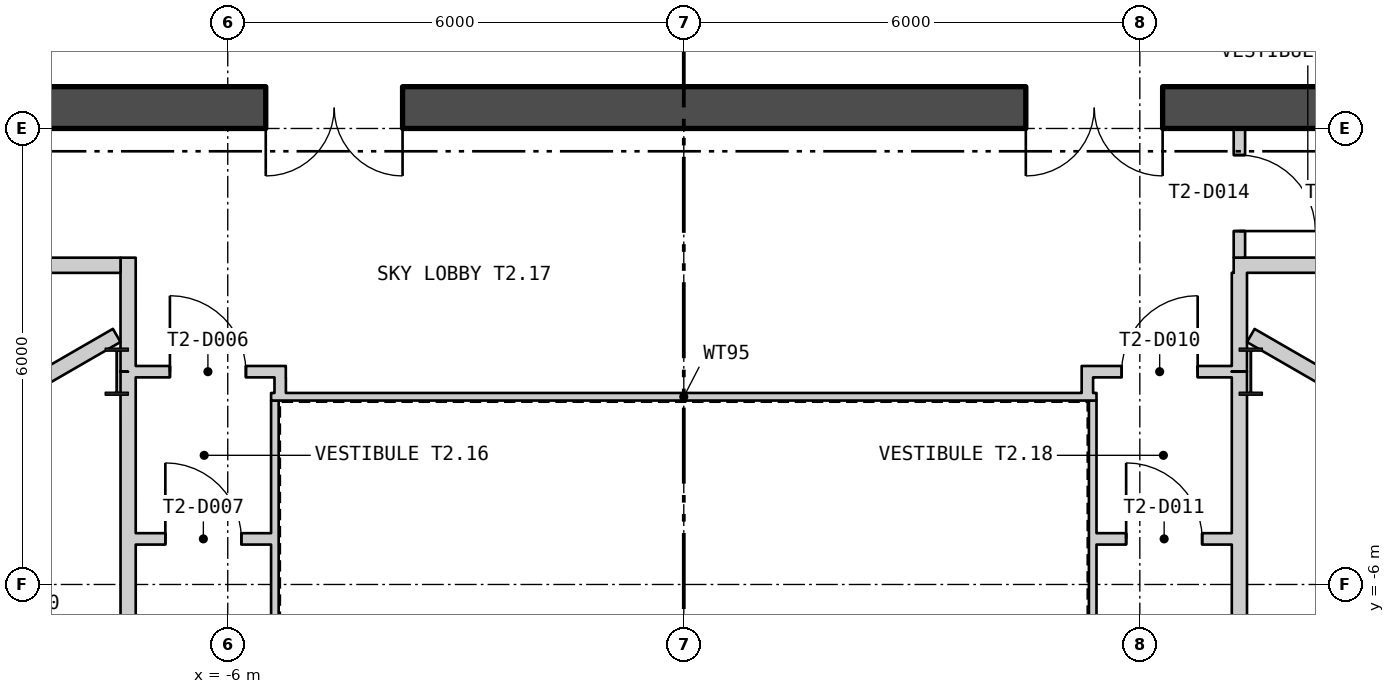
"""IFC4 building model, lengths in metres.
Left out: names, types, materials, properties, quantities, classifications, styles, units other than length and angle.
Written with IfcOpenShell. Run it as: python <this file> out.ifc"""

import sys

from ifc_helpers import new_model, si_unit, direction, frame, frame_2d, origin, origin_2d, place, context, subcontext, project, spatial, polyline, rectangle, i_section, outline, extrude, element, fill, save


model = new_model("IFC4")
c1 = context("Model", 3, precision=1e-05, world=origin(), true_north=direction((0.0, 1.0)))
c2 = subcontext(c1, "Body", "Model", "MODEL_VIEW")
j1 = project(units=[si_unit("LENGTHUNIT", "METRE"), si_unit("PLANEANGLEUNIT", "RADIAN")], contexts=[c1])
p1 = place(None, origin())
s1 = spatial("IfcSite", under=j1, at=p1, CompositionType="ELEMENT")
p2 = place(p1, origin())
s2 = spatial("IfcBuilding", under=s1, at=p2, CompositionType="ELEMENT")
p3 = place(p2, frame((0.0, 0.0, 133.8)))
s3 = spatial("IfcBuildingStorey", under=s2, at=p3, CompositionType="ELEMENT", Elevation=133.8)
for number, where, z_axis, x_axis in (
    (1, (7.46, -3.2, 0.0), (0.0, 0.0, 1.0), (1.0, 0.0, 0.0)),
    (2, (-7.46, -3.2, 0.0), (0.0, 0.0, 1.0), (1.0, 0.0, 0.0)),
):
    element("IfcColumn", number, at=place(p3, frame(where, z_axis=z_axis, x_axis=x_axis)), inside=s3, PredefinedType="COLUMN", context=c2, shape_type="SweptSolid", body=[
        extrude(i_section(OverallWidth=0.305, OverallDepth=0.62, WebThickness=0.021, FlangeThickness=0.04, at=origin_2d()), origin(), (0.0, 0.0, 1.0), 6.0),
    ])
p4 = place(p3, frame((-27.365, 12.198, -0.18), z_axis=(0.0, 0.0, 1.0), x_axis=(0.500000335318, -0.866025210188, 0.0)))
e3 = element("IfcWall", 3, at=p4, inside=s3, PredefinedType="SOLIDWALL", context=c2, shape_type="SweptSolid", body=[
    extrude(outline(polyline([(-0.13, -0.225), (45.88, -0.225), (45.62, 0.225), (0.13, 0.225), (-0.13, -0.225)])), origin(), (0.0, 0.0, 1.0), 6.0),
])
p5 = place(p4, frame((1.425, 0.0, 1.38)))
e4 = element("IfcOpeningElement", 4, at=p5, cuts=e3, PredefinedType="OPENING", context=c2, shape_type="SweptSolid", body=[
    extrude(rectangle(XDim=2.4, YDim=3.6, at=frame_2d((1.2, 1.8))), frame((0.0, 0.235, 0.0), z_axis=(0.0, -1.0, 0.0), x_axis=(1.0, 0.0, 0.0)), (0.0, 0.0, 1.0), 0.47),
])
p6 = place(p4, frame((5.895, 0.0, 1.38)))
e5 = element("IfcOpeningElement", 5, at=p6, cuts=e3, PredefinedType="OPENING", context=c2, shape_type="SweptSolid", body=[
    extrude(rectangle(XDim=2.4, YDim=3.6, at=frame_2d((1.2, 1.8))), frame((0.0, 0.235, 0.0), z_axis=(0.0, -1.0, 0.0), x_axis=(1.0, 0.0, 0.0)), (0.0, 0.0, 1.0), 0.47),
])
p7 = place(p4, frame((10.403, 0.0, 1.38)))
e6 = element("IfcOpeningElement", 6, at=p7, cuts=e3, PredefinedType="OPENING", context=c2, shape_type="SweptSolid", body=[
    extrude(rectangle(XDim=2.4, YDim=3.6, at=frame_2d((1.2, 1.8))), frame((0.0, 0.235, 0.0), z_axis=(0.0, -1.0, 0.0), x_axis=(1.0, 0.0, 0.0)), (0.0, 0.0, 1.0), 0.47),
])
p8 = place(p4, frame((14.912, 0.0, 1.38)))
e7 = element("IfcOpeningElement", 7, at=p8, cuts=e3, PredefinedType="OPENING", context=c2, shape_type="SweptSolid", body=[
    extrude(rectangle(XDim=2.4, YDim=3.6, at=frame_2d((1.2, 1.8))), frame((0.0, 0.235, 0.0), z_axis=(0.0, -1.0, 0.0), x_axis=(1.0, 0.0, 0.0)), (0.0, 0.0, 1.0), 0.47),
])
p9 = place(p4, frame((19.421, 0.0, 1.38)))
e8 = element("IfcOpeningElement", 8, at=p9, cuts=e3, PredefinedType="OPENING", context=c2, shape_type="SweptSolid", body=[
    extrude(rectangle(XDim=2.4, YDim=3.6, at=frame_2d((1.2, 1.8))), frame((0.0, 0.235, 0.0), z_axis=(0.0, -1.0, 0.0), x_axis=(1.0, 0.0, 0.0)), (0.0, 0.0, 1.0), 0.47),
])
p10 = place(p4, frame((23.929, 0.0, 1.38)))
e9 = element("IfcOpeningElement", 9, at=p10, cuts=e3, PredefinedType="OPENING", context=c2, shape_type="SweptSolid", body=[
    extrude(rectangle(XDim=2.4, YDim=3.6, at=frame_2d((1.2, 1.8))), frame((0.0, 0.235, 0.0), z_axis=(0.0, -1.0, 0.0), x_axis=(1.0, 0.0, 0.0)), (0.0, 0.0, 1.0), 0.47),
])
p11 = place(p4, frame((28.438, 0.0, 1.38)))
e10 = element("IfcOpeningElement", 10, at=p11, cuts=e3, PredefinedType="OPENING", context=c2, shape_type="SweptSolid", body=[
    extrude(rectangle(XDim=2.4, YDim=3.6, at=frame_2d((1.2, 1.8))), frame((0.0, 0.235, 0.0), z_axis=(0.0, -1.0, 0.0), x_axis=(1.0, 0.0, 0.0)), (0.0, 0.0, 1.0), 0.47),
])
p12 = place(p4, frame((32.947, 0.0, 1.38)))
e11 = element("IfcOpeningElement", 11, at=p12, cuts=e3, PredefinedType="OPENING", context=c2, shape_type="SweptSolid", body=[
    extrude(rectangle(XDim=2.4, YDim=3.6, at=frame_2d((1.2, 1.8))), frame((0.0, 0.235, 0.0), z_axis=(0.0, -1.0, 0.0), x_axis=(1.0, 0.0, 0.0)), (0.0, 0.0, 1.0), 0.47),
])
p13 = place(p4, frame((37.455, 0.0, 1.38)))
e12 = element("IfcOpeningElement", 12, at=p13, cuts=e3, PredefinedType="OPENING", context=c2, shape_type="SweptSolid", body=[
    extrude(rectangle(XDim=2.4, YDim=3.6, at=frame_2d((1.2, 1.8))), frame((0.0, 0.235, 0.0), z_axis=(0.0, -1.0, 0.0), x_axis=(1.0, 0.0, 0.0)), (0.0, 0.0, 1.0), 0.47),
])
p14 = place(p4, frame((41.925, 0.0, 1.38)))
e13 = element("IfcOpeningElement", 13, at=p14, cuts=e3, PredefinedType="OPENING", context=c2, shape_type="SweptSolid", body=[
    extrude(rectangle(XDim=2.4, YDim=3.6, at=frame_2d((1.2, 1.8))), frame((0.0, 0.235, 0.0), z_axis=(0.0, -1.0, 0.0), x_axis=(1.0, 0.0, 0.0)), (0.0, 0.0, 1.0), 0.47),
])
p15 = place(p3, frame((4.49, -27.423, -0.18), z_axis=(0.0, 0.0, 1.0), x_axis=(0.500000335318, 0.866025210188, 0.0)))
e14 = element("IfcWall", 14, at=p15, inside=s3, PredefinedType="SOLIDWALL", context=c2, shape_type="SweptSolid", body=[
    extrude(outline(polyline([(-0.13, -0.225), (45.88, -0.225), (45.62, 0.225), (0.13, 0.225), (-0.13, -0.225)])), origin(), (0.0, 0.0, 1.0), 6.0),
])
p16 = place(p15, frame((1.425, 0.0, 1.38)))
e15 = element("IfcOpeningElement", 15, at=p16, cuts=e14, PredefinedType="OPENING", context=c2, shape_type="SweptSolid", body=[
    extrude(rectangle(XDim=2.4, YDim=3.6, at=frame_2d((1.2, 1.8))), frame((0.0, 0.235, 0.0), z_axis=(0.0, -1.0, 0.0), x_axis=(1.0, 0.0, 0.0)), (0.0, 0.0, 1.0), 0.47),
])
p17 = place(p15, frame((5.895, 0.0, 1.38)))
e16 = element("IfcOpeningElement", 16, at=p17, cuts=e14, PredefinedType="OPENING", context=c2, shape_type="SweptSolid", body=[
    extrude(rectangle(XDim=2.4, YDim=3.6, at=frame_2d((1.2, 1.8))), frame((0.0, 0.235, 0.0), z_axis=(0.0, -1.0, 0.0), x_axis=(1.0, 0.0, 0.0)), (0.0, 0.0, 1.0), 0.47),
])
p18 = place(p15, frame((10.403, 0.0, 1.38)))
e17 = element("IfcOpeningElement", 17, at=p18, cuts=e14, PredefinedType="OPENING", context=c2, shape_type="SweptSolid", body=[
    extrude(rectangle(XDim=2.4, YDim=3.6, at=frame_2d((1.2, 1.8))), frame((0.0, 0.235, 0.0), z_axis=(0.0, -1.0, 0.0), x_axis=(1.0, 0.0, 0.0)), (0.0, 0.0, 1.0), 0.47),
])
p19 = place(p15, frame((14.912, 0.0, 1.38)))
e18 = element("IfcOpeningElement", 18, at=p19, cuts=e14, PredefinedType="OPENING", context=c2, shape_type="SweptSolid", body=[
    extrude(rectangle(XDim=2.4, YDim=3.6, at=frame_2d((1.2, 1.8))), frame((0.0, 0.235, 0.0), z_axis=(0.0, -1.0, 0.0), x_axis=(1.0, 0.0, 0.0)), (0.0, 0.0, 1.0), 0.47),
])
p20 = place(p15, frame((19.421, 0.0, 1.38)))
e19 = element("IfcOpeningElement", 19, at=p20, cuts=e14, PredefinedType="OPENING", context=c2, shape_type="SweptSolid", body=[
    extrude(rectangle(XDim=2.4, YDim=3.6, at=frame_2d((1.2, 1.8))), frame((0.0, 0.235, 0.0), z_axis=(0.0, -1.0, 0.0), x_axis=(1.0, 0.0, 0.0)), (0.0, 0.0, 1.0), 0.47),
])
p21 = place(p15, frame((23.929, 0.0, 1.38)))
e20 = element("IfcOpeningElement", 20, at=p21, cuts=e14, PredefinedType="OPENING", context=c2, shape_type="SweptSolid", body=[
    extrude(rectangle(XDim=2.4, YDim=3.6, at=frame_2d((1.2, 1.8))), frame((0.0, 0.235, 0.0), z_axis=(0.0, -1.0, 0.0), x_axis=(1.0, 0.0, 0.0)), (0.0, 0.0, 1.0), 0.47),
])
p22 = place(p15, frame((28.438, 0.0, 1.38)))
e21 = element("IfcOpeningElement", 21, at=p22, cuts=e14, PredefinedType="OPENING", context=c2, shape_type="SweptSolid", body=[
    extrude(rectangle(XDim=2.4, YDim=3.6, at=frame_2d((1.2, 1.8))), frame((0.0, 0.235, 0.0), z_axis=(0.0, -1.0, 0.0), x_axis=(1.0, 0.0, 0.0)), (0.0, 0.0, 1.0), 0.47),
])
p23 = place(p15, frame((32.947, 0.0, 1.38)))
e22 = element("IfcOpeningElement", 22, at=p23, cuts=e14, PredefinedType="OPENING", context=c2, shape_type="SweptSolid", body=[
    extrude(rectangle(XDim=2.4, YDim=3.6, at=frame_2d((1.2, 1.8))), frame((0.0, 0.235, 0.0), z_axis=(0.0, -1.0, 0.0), x_axis=(1.0, 0.0, 0.0)), (0.0, 0.0, 1.0), 0.47),
])
p24 = place(p15, frame((37.455, 0.0, 1.38)))
e23 = element("IfcOpeningElement", 23, at=p24, cuts=e14, PredefinedType="OPENING", context=c2, shape_type="SweptSolid", body=[
    extrude(rectangle(XDim=2.4, YDim=3.6, at=frame_2d((1.2, 1.8))), frame((0.0, 0.235, 0.0), z_axis=(0.0, -1.0, 0.0), x_axis=(1.0, 0.0, 0.0)), (0.0, 0.0, 1.0), 0.47),
])
p25 = place(p15, frame((41.925, 0.0, 1.38)))
e24 = element("IfcOpeningElement", 24, at=p25, cuts=e14, PredefinedType="OPENING", context=c2, shape_type="SweptSolid", body=[
    extrude(rectangle(XDim=2.4, YDim=3.6, at=frame_2d((1.2, 1.8))), frame((0.0, 0.235, 0.0), z_axis=(0.0, -1.0, 0.0), x_axis=(1.0, 0.0, 0.0)), (0.0, 0.0, 1.0), 0.47),
])
p26 = place(p3, frame((5.38, -11.62, 0.0), z_axis=(0.0, 0.0, 1.0), x_axis=(0.0, 1.0, 0.0)))
e25 = element("IfcWall", 25, at=p26, inside=s3, PredefinedType="PARTITIONING", context=c2, shape_type="SweptSolid", body=[
    extrude(rectangle(XDim=8.04, YDim=0.1, at=frame_2d((4.02, 0.0))), origin(), (0.0, 0.0, 1.0), 5.8),
])
p27 = place(p3, frame((5.43, -3.53, 0.0), z_axis=(0.0, 0.0, 1.0), x_axis=(-1.0, 0.0, 0.0)))
e26 = element("IfcWall", 26, at=p27, inside=s3, PredefinedType="PARTITIONING", context=c2, shape_type="SweptSolid", body=[
    extrude(rectangle(XDim=10.86, YDim=0.1, at=frame_2d((5.43, 0.0))), origin(), (0.0, 0.0, 1.0), 5.8),
])
p28 = place(p3, frame((-5.38, -3.58, 0.0), z_axis=(0.0, 0.0, 1.0), x_axis=(0.0, -1.0, 0.0)))
e27 = element("IfcWall", 27, at=p28, inside=s3, PredefinedType="PARTITIONING", context=c2, shape_type="SweptSolid", body=[
    extrude(rectangle(XDim=8.04, YDim=0.1, at=frame_2d((4.02, 0.0))), origin(), (0.0, 0.0, 1.0), 5.8),
])
p29 = place(p3, frame((-17.5, 0.275, 0.0), z_axis=(0.0, 0.0, 1.0), x_axis=(1.0, 0.0, 0.0)))
e28 = element("IfcWall", 28, at=p29, inside=s3, PredefinedType="SHEAR", context=c2, shape_type="SweptSolid", body=[
    extrude(rectangle(XDim=35.0, YDim=0.55, at=frame_2d((17.5, 0.0))), origin(), (0.0, 0.0, 1.0), 5.8),
])
p30 = place(p29, frame((12.0, 0.0, 0.0)))
e29 = element("IfcOpeningElement", 29, at=p30, cuts=e28, PredefinedType="OPENING", context=c2, shape_type="SweptSolid", body=[
    extrude(rectangle(XDim=1.8, YDim=2.4, at=frame_2d((0.9, 1.2))), frame((0.0, 0.285, 0.0), z_axis=(0.0, -1.0, 0.0), x_axis=(1.0, 0.0, 0.0)), (0.0, 0.0, 1.0), 0.57),
])
p31 = place(p29, frame((22.0, 0.0, 0.0)))
e30 = element("IfcOpeningElement", 30, at=p31, cuts=e28, PredefinedType="OPENING", context=c2, shape_type="SweptSolid", body=[
    extrude(rectangle(XDim=1.8, YDim=2.4, at=frame_2d((0.9, 1.2))), frame((0.0, 0.285, 0.0), z_axis=(0.0, -1.0, 0.0), x_axis=(1.0, 0.0, 0.0)), (0.0, 0.0, 1.0), 0.57),
])
p32 = place(p3, frame((-19.023, -1.8, 0.0), z_axis=(0.0, 0.0, 1.0), x_axis=(1.0, 0.0, 0.0)))
e31 = element("IfcWall", 31, at=p32, inside=s3, PredefinedType="PARTITIONING", context=c2, shape_type="SweptSolid", body=[
    extrude(rectangle(XDim=11.612, YDim=0.2, at=frame_2d((5.806, 0.0))), origin(), (0.0, 0.0, 1.0), 5.8),
])
p33 = place(p32, frame((7.262, 0.0, 0.0)))
e32 = element("IfcOpeningElement", 32, at=p33, cuts=e31, PredefinedType="OPENING", context=c2, shape_type="SweptSolid", body=[
    extrude(rectangle(XDim=1.1, YDim=2.1, at=frame_2d((0.55, 1.05))), frame((0.0, 0.11, 0.0), z_axis=(0.0, -1.0, 0.0), x_axis=(1.0, 0.0, 0.0)), (0.0, 0.0, 1.0), 0.22),
])
p34 = place(p3, frame((-15.344, -7.274, 0.0), z_axis=(0.0, 0.0, 1.0), x_axis=(0.866037399706, 0.499979221878, 0.0)))
e33 = element("IfcWall", 33, at=p34, inside=s3, PredefinedType="PARTITIONING", context=c2, shape_type="SweptSolid", body=[
    extrude(rectangle(XDim=9.102, YDim=0.2, at=frame_2d((4.551, 0.0))), origin(), (0.0, 0.0, 1.0), 5.8),
])
p35 = place(p3, frame((-7.31, -13.699, 0.0), z_axis=(0.0, 0.0, 1.0), x_axis=(-8.5722449e-05, 0.999999996326, 0.0)))
e34 = element("IfcWall", 34, at=p35, inside=s3, PredefinedType="PARTITIONING", context=c2, shape_type="SweptSolid", body=[
    extrude(rectangle(XDim=10.499, YDim=0.2, at=frame_2d((5.25, 0.0))), origin(), (0.0, 0.0, 1.0), 5.21),
])
p36 = place(p35, frame((2.653, 0.0, 0.0)))
e35 = element("IfcOpeningElement", 35, at=p36, cuts=e34, PredefinedType="OPENING", context=c2, shape_type="SweptSolid", body=[
    extrude(rectangle(XDim=1.1, YDim=2.1, at=frame_2d((0.55, 1.05))), frame((0.0, 0.11, 0.0), z_axis=(0.0, -1.0, 0.0), x_axis=(1.0, 0.0, 0.0)), (0.0, 0.0, 1.0), 0.22),
])
p37 = place(p35, frame((6.056, 0.0, 0.0)))
e36 = element("IfcOpeningElement", 36, at=p37, cuts=e34, PredefinedType="OPENING", context=c2, shape_type="SweptSolid", body=[
    extrude(rectangle(XDim=1.1, YDim=2.1, at=frame_2d((0.55, 1.05))), frame((0.0, 0.11, 0.0), z_axis=(0.0, -1.0, 0.0), x_axis=(1.0, 0.0, 0.0)), (0.0, 0.0, 1.0), 0.22),
])
p38 = place(p3, frame((-7.311, -3.2, 0.0), z_axis=(0.0, 0.0, 1.0), x_axis=(-6.6666667e-05, 0.999999997778, 0.0)))
e37 = element("IfcWall", 37, at=p38, inside=s3, PredefinedType="PARTITIONING", context=c2, shape_type="SweptSolid", body=[
    extrude(rectangle(XDim=1.5, YDim=0.2, at=frame_2d((0.75, 0.0))), origin(), (0.0, 0.0, 1.0), 5.8),
])
p39 = place(p3, frame((-7.211, -3.2, 0.0), z_axis=(0.0, 0.0, 1.0), x_axis=(1.0, 0.0, 0.0)))
e38 = element("IfcWall", 38, at=p39, inside=s3, PredefinedType="PARTITIONING", context=c2, shape_type="SweptSolid", body=[
    extrude(rectangle(XDim=1.975, YDim=0.15, at=frame_2d((0.988, 0.0))), origin(), (0.0, 0.0, 1.0), 4.89),
])
p40 = place(p39, frame((0.45, 0.0, 0.0)))
e39 = element("IfcOpeningElement", 39, at=p40, cuts=e38, PredefinedType="OPENING", context=c2, shape_type="SweptSolid", body=[
    extrude(rectangle(XDim=1.0, YDim=2.1, at=frame_2d((0.5, 1.05))), frame((0.0, 0.085, 0.0), z_axis=(0.0, -1.0, 0.0), x_axis=(1.0, 0.0, 0.0)), (0.0, 0.0, 1.0), 0.17),
])
p41 = place(p3, frame((-7.211, -5.4, 0.0), z_axis=(0.0, 0.0, 1.0), x_axis=(1.0, 0.0, 0.0)))
e40 = element("IfcWall", 40, at=p41, inside=s3, PredefinedType="PARTITIONING", context=c2, shape_type="SweptSolid", body=[
    extrude(rectangle(XDim=1.781, YDim=0.15, at=frame_2d((0.89, 0.0))), origin(), (0.0, 0.0, 1.0), 5.8),
])
p42 = place(p41, frame((0.39, 0.0, 0.0)))
e41 = element("IfcOpeningElement", 41, at=p42, cuts=e40, PredefinedType="OPENING", context=c2, shape_type="SweptSolid", body=[
    extrude(rectangle(XDim=1.0, YDim=2.1, at=frame_2d((0.5, 1.05))), frame((0.0, 0.085, 0.0), z_axis=(0.0, -1.0, 0.0), x_axis=(1.0, 0.0, 0.0)), (0.0, 0.0, 1.0), 0.17),
])
p43 = place(p3, frame((-5.31, -3.48, 0.0), z_axis=(0.0, 0.0, 1.0), x_axis=(0.0, 1.0, 0.0)))
e42 = element("IfcWall", 42, at=p43, inside=s3, PredefinedType="PARTITIONING", context=c2, shape_type="SweptSolid", body=[
    extrude(rectangle(XDim=0.205, YDim=0.15, at=frame_2d((0.102, 0.0))), origin(), (0.0, 0.0, 1.0), 5.8),
])
p44 = place(p3, frame((5.235, -3.2, 0.0), z_axis=(0.0, 0.0, 1.0), x_axis=(1.0, 0.0, 0.0)))
e43 = element("IfcWall", 43, at=p44, inside=s3, PredefinedType="PARTITIONING", context=c2, shape_type="SweptSolid", body=[
    extrude(rectangle(XDim=1.975, YDim=0.15, at=frame_2d((0.988, 0.0))), origin(), (0.0, 0.0, 1.0), 4.89),
])
p45 = place(p44, frame((0.526, 0.0, 0.0)))
e44 = element("IfcOpeningElement", 44, at=p45, cuts=e43, PredefinedType="OPENING", context=c2, shape_type="SweptSolid", body=[
    extrude(rectangle(XDim=1.0, YDim=2.1, at=frame_2d((0.5, 1.05))), frame((0.0, 0.085, 0.0), z_axis=(0.0, -1.0, 0.0), x_axis=(1.0, 0.0, 0.0)), (0.0, 0.0, 1.0), 0.17),
])
p46 = place(p3, frame((5.31, -3.48, 0.0), z_axis=(0.0, 0.0, 1.0), x_axis=(0.0, 1.0, 0.0)))
e45 = element("IfcWall", 45, at=p46, inside=s3, PredefinedType="PARTITIONING", context=c2, shape_type="SweptSolid", body=[
    extrude(rectangle(XDim=0.205, YDim=0.15, at=frame_2d((0.102, 0.0))), origin(), (0.0, 0.0, 1.0), 5.8),
])
p47 = place(p3, frame((5.43, -5.4, 0.0), z_axis=(0.0, 0.0, 1.0), x_axis=(1.0, 0.0, 0.0)))
e46 = element("IfcWall", 46, at=p47, inside=s3, PredefinedType="PARTITIONING", context=c2, shape_type="SweptSolid", body=[
    extrude(rectangle(XDim=1.78, YDim=0.15, at=frame_2d((0.89, 0.0))), origin(), (0.0, 0.0, 1.0), 5.8),
])
p48 = place(p47, frame((0.39, 0.0, 0.0)))
e47 = element("IfcOpeningElement", 47, at=p48, cuts=e46, PredefinedType="OPENING", context=c2, shape_type="SweptSolid", body=[
    extrude(rectangle(XDim=1.0, YDim=2.1, at=frame_2d((0.5, 1.05))), frame((0.0, 0.085, 0.0), z_axis=(0.0, -1.0, 0.0), x_axis=(1.0, 0.0, 0.0)), (0.0, 0.0, 1.0), 0.17),
])
p49 = place(p3, frame((7.235, -1.799, 0.0), z_axis=(0.0, 0.0, 1.0), x_axis=(0.999999996402, -8.4832032e-05, 0.0)))
e48 = element("IfcWall", 48, at=p49, inside=s3, PredefinedType="PARTITIONING", context=c2, shape_type="SweptSolid", body=[
    extrude(rectangle(XDim=11.788, YDim=0.2, at=frame_2d((5.894, 0.0))), origin(), (0.0, 0.0, 1.0), 5.8),
])
p50 = place(p49, frame((2.726, 0.0, 0.0)))
e49 = element("IfcOpeningElement", 49, at=p50, cuts=e48, PredefinedType="OPENING", context=c2, shape_type="SweptSolid", body=[
    extrude(rectangle(XDim=1.1, YDim=2.1, at=frame_2d((0.55, 1.05))), frame((0.0, 0.11, 0.0), z_axis=(0.0, -1.0, 0.0), x_axis=(1.0, 0.0, 0.0)), (0.0, 0.0, 1.0), 0.22),
])
p51 = place(p3, frame((7.31, -12.961, 0.0), z_axis=(0.0, 0.0, 1.0), x_axis=(0.0, 1.0, 0.0)))
e50 = element("IfcWall", 50, at=p51, inside=s3, PredefinedType="PARTITIONING", context=c2, shape_type="SweptSolid", body=[
    extrude(rectangle(XDim=9.761, YDim=0.2, at=frame_2d((4.88, 0.0))), origin(), (0.0, 0.0, 1.0), 5.21),
])
p52 = place(p51, frame((3.111, 0.0, 0.0)))
e51 = element("IfcOpeningElement", 51, at=p52, cuts=e50, PredefinedType="OPENING", context=c2, shape_type="SweptSolid", body=[
    extrude(rectangle(XDim=1.1, YDim=2.1, at=frame_2d((0.55, 1.05))), frame((0.0, 0.11, 0.0), z_axis=(0.0, -1.0, 0.0), x_axis=(1.0, 0.0, 0.0)), (0.0, 0.0, 1.0), 0.22),
])
p53 = place(p3, frame((7.31, -3.2, 0.0), z_axis=(0.0, 0.0, 1.0), x_axis=(0.0, 1.0, 0.0)))
e52 = element("IfcWall", 52, at=p53, inside=s3, PredefinedType="PARTITIONING", context=c2, shape_type="SweptSolid", body=[
    extrude(rectangle(XDim=1.301, YDim=0.2, at=frame_2d((0.65, 0.0))), origin(), (0.0, 0.0, 1.0), 5.8),
])
p54 = place(p3, frame((7.31, -1.699, 0.0), z_axis=(0.0, 0.0, 1.0), x_axis=(0.0, 1.0, 0.0)))
e53 = element("IfcWall", 53, at=p54, inside=s3, PredefinedType="PARTITIONING", context=c2, shape_type="SweptSolid", body=[
    extrude(rectangle(XDim=1.698, YDim=0.15, at=frame_2d((0.849, 0.0))), origin(), (0.0, 0.0, 1.0), 5.8),
])
p55 = place(p54, frame((0.349, 0.0, 0.0)))
e54 = element("IfcOpeningElement", 54, at=p55, cuts=e53, PredefinedType="OPENING", context=c2, shape_type="SweptSolid", body=[
    extrude(rectangle(XDim=1.0, YDim=2.1, at=frame_2d((0.5, 1.05))), frame((0.0, 0.085, 0.0), z_axis=(0.0, -1.0, 0.0), x_axis=(1.0, 0.0, 0.0)), (0.0, 0.0, 1.0), 0.17),
])
p56 = place(p3, frame((7.46, -2.724, 0.0), z_axis=(0.0, 0.0, 1.0), x_axis=(0.866112420066, -0.499849253082, 0.0)))
e55 = element("IfcWall", 55, at=p56, inside=s3, PredefinedType="PARTITIONING", context=c2, shape_type="SweptSolid", body=[
    extrude(rectangle(XDim=9.103, YDim=0.2, at=frame_2d((4.551, 0.0))), origin(), (0.0, 0.0, 1.0), 5.8),
])
p57 = place(p30, origin())
e56 = element("IfcDoor", 56, at=p57, inside=s3, OperationType="DOUBLE_DOOR_SINGLE_SWING", PredefinedType="DOOR", context=c2, shape_type="SweptSolid", body=[
    extrude(rectangle(XDim=1.8, YDim=2.4, at=frame_2d((0.9, 1.2))), frame((0.0, 0.025, 0.0), z_axis=(0.0, -1.0, 0.0), x_axis=(1.0, 0.0, 0.0)), (0.0, 0.0, 1.0), 0.05),
])
fill(e29, e56)
p58 = place(p31, origin())
e57 = element("IfcDoor", 57, at=p58, inside=s3, OperationType="DOUBLE_DOOR_SINGLE_SWING", PredefinedType="DOOR", context=c2, shape_type="SweptSolid", body=[
    extrude(rectangle(XDim=1.8, YDim=2.4, at=frame_2d((0.9, 1.2))), frame((0.0, 0.025, 0.0), z_axis=(0.0, -1.0, 0.0), x_axis=(1.0, 0.0, 0.0)), (0.0, 0.0, 1.0), 0.05),
])
fill(e30, e57)
p59 = place(p40, origin())
e58 = element("IfcDoor", 58, at=p59, inside=s3, OperationType="SINGLE_SWING_RIGHT", PredefinedType="DOOR", context=c2, shape_type="SweptSolid", body=[
    extrude(rectangle(XDim=1.0, YDim=2.1, at=frame_2d((0.5, 1.05))), frame((0.0, 0.025, 0.0), z_axis=(0.0, -1.0, 0.0), x_axis=(1.0, 0.0, 0.0)), (0.0, 0.0, 1.0), 0.05),
])
fill(e39, e58)
p60 = place(p42, origin())
e59 = element("IfcDoor", 59, at=p60, inside=s3, OperationType="SINGLE_SWING_RIGHT", PredefinedType="DOOR", context=c2, shape_type="SweptSolid", body=[
    extrude(rectangle(XDim=1.0, YDim=2.1, at=frame_2d((0.5, 1.05))), frame((0.0, 0.025, 0.0), z_axis=(0.0, -1.0, 0.0), x_axis=(1.0, 0.0, 0.0)), (0.0, 0.0, 1.0), 0.05),
])
fill(e41, e59)
p61 = place(p45, origin())
e60 = element("IfcDoor", 60, at=p61, inside=s3, OperationType="SINGLE_SWING_LEFT", PredefinedType="DOOR", context=c2, shape_type="SweptSolid", body=[
    extrude(rectangle(XDim=1.0, YDim=2.1, at=frame_2d((0.5, 1.05))), frame((0.0, 0.025, 0.0), z_axis=(0.0, -1.0, 0.0), x_axis=(1.0, 0.0, 0.0)), (0.0, 0.0, 1.0), 0.05),
])
fill(e44, e60)
p62 = place(p48, origin())
e61 = element("IfcDoor", 61, at=p62, inside=s3, OperationType="SINGLE_SWING_RIGHT", PredefinedType="DOOR", context=c2, shape_type="SweptSolid", body=[
    extrude(rectangle(XDim=1.0, YDim=2.1, at=frame_2d((0.5, 1.05))), frame((0.0, 0.025, 0.0), z_axis=(0.0, -1.0, 0.0), x_axis=(1.0, 0.0, 0.0)), (0.0, 0.0, 1.0), 0.05),
])
fill(e47, e61)
p63 = place(p55, origin())
e62 = element("IfcDoor", 62, at=p63, inside=s3, OperationType="SINGLE_SWING_LEFT", PredefinedType="DOOR", context=c2, shape_type="SweptSolid", body=[
    extrude(rectangle(XDim=1.0, YDim=2.1, at=frame_2d((0.5, 1.05))), frame((0.0, 0.025, 0.0), z_axis=(0.0, -1.0, 0.0), x_axis=(1.0, 0.0, 0.0)), (0.0, 0.0, 1.0), 0.05),
])
fill(e54, e62)
save(model, sys.argv[1])
